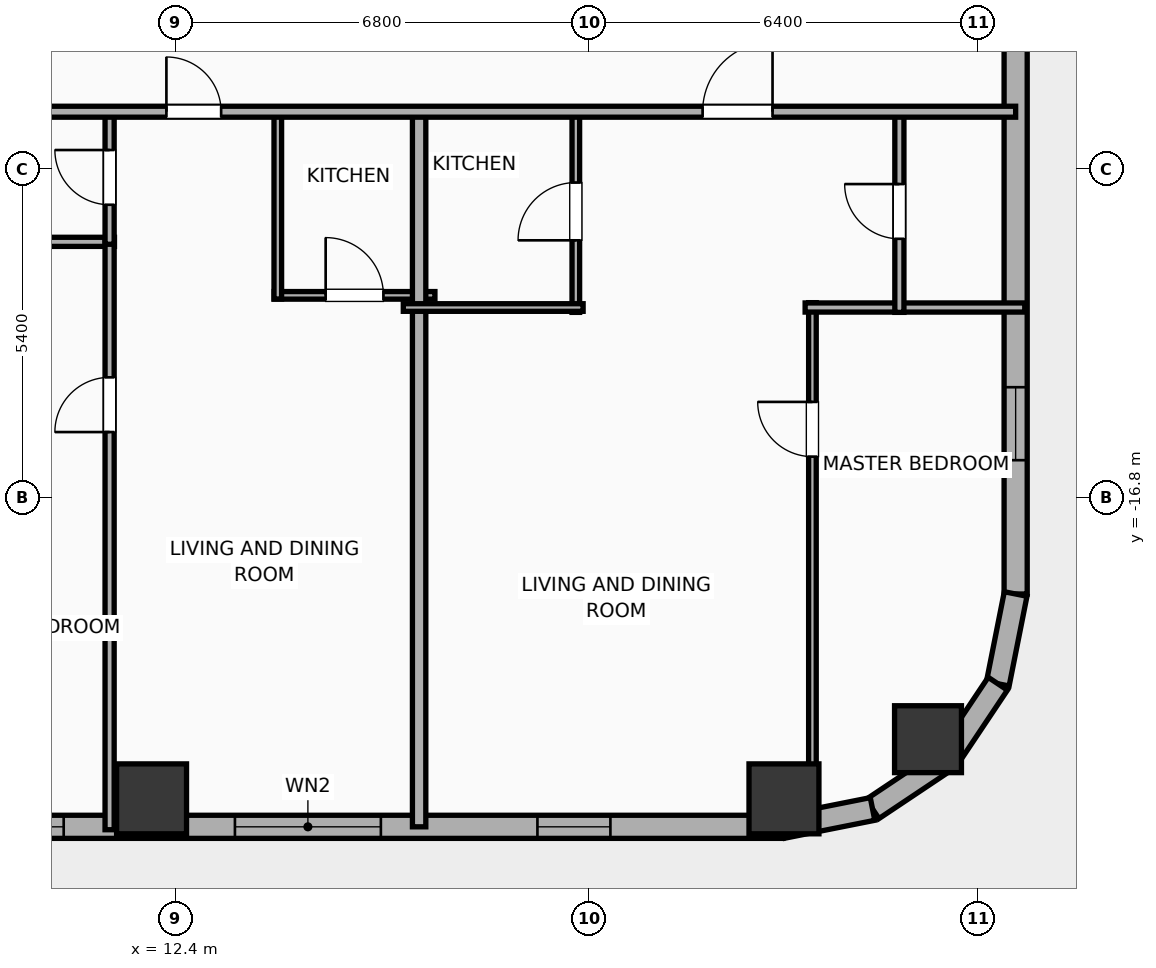
"""IFC4 building model, lengths in metres.
Left out: names, types, materials, properties, quantities, classifications, styles, units other than length and angle.
Written with IfcOpenShell. Run it as: python <this file> out.ifc"""

import sys

from ifc_helpers import new_model, si_unit, direction, frame, frame_2d, origin, origin_2d, place, context, subcontext, project, spatial, rectangle, hollow_rectangle, hollow_circle, extrude, element, fill, save


model = new_model("IFC4")
c1 = context("Model", 3, precision=1e-05, world=origin(), true_north=direction((0.0, 1.0)))
c2 = subcontext(c1, "Body", "Model", "MODEL_VIEW")
j1 = project(units=[si_unit("LENGTHUNIT", "METRE"), si_unit("PLANEANGLEUNIT", "RADIAN")], contexts=[c1])
p1 = place(None, origin())
s1 = spatial("IfcSite", under=j1, at=p1, CompositionType="ELEMENT")
p2 = place(p1, origin())
s2 = spatial("IfcBuilding", under=s1, at=p2, CompositionType="ELEMENT")
p3 = place(p2, frame((0.0, 0.0, 26.0)))
s3 = spatial("IfcBuildingStorey", under=s2, at=p3, CompositionType="ELEMENT", Elevation=26.0)
for number, where, z_axis, x_axis in (
    (1, (12.0, -21.75, -0.25), (0.0, 0.0, 1.0), (1.0, 0.0, 0.0)),
    (2, (22.4, -21.75, -0.25), (0.0, 0.0, 1.0), (1.0, 0.0, 0.0)),
):
    element("IfcColumn", number, at=place(p3, frame(where, z_axis=z_axis, x_axis=x_axis)), inside=s3, PredefinedType="COLUMN", context=c2, shape_type="SweptSolid", body=[
        extrude(hollow_rectangle(XDim=1.15, YDim=1.15, WallThickness=0.04, at=origin_2d()), origin(), (0.0, 0.0, 1.0), 4.15),
    ])
p4 = place(p3, frame((24.769, -20.769, -0.25), z_axis=(0.0, 0.0, 1.0), x_axis=(1.0, 0.0, 0.0)))
e3 = element("IfcColumn", 3, at=p4, inside=s3, PredefinedType="COLUMN", context=c2, shape_type="SweptSolid", body=[
    extrude(hollow_circle(Radius=0.55, WallThickness=0.036, at=origin_2d()), origin(), (0.0, 0.0, 1.0), 4.15),
])
p5 = place(p3, frame((22.381, -22.21, 0.0), z_axis=(0.0, 0.0, 1.0), x_axis=(-1.0, 0.0, 0.0)))
e4 = element("IfcWall", 4, at=p5, inside=s3, PredefinedType="ELEMENTEDWALL", context=c2, shape_type="SweptSolid", body=[
    extrude(rectangle(XDim=51.963, YDim=0.38, at=frame_2d((25.981, 0.0))), origin(), (0.0, 0.0, 1.0), 2.54),
])
p6 = place(p5, frame((25.231, 0.0, 0.0)))
e5 = element("IfcOpeningElement", 5, at=p6, cuts=e4, PredefinedType="OPENING", context=c2, shape_type="SweptSolid", body=[
    extrude(rectangle(XDim=1.5, YDim=2.05, at=frame_2d((0.75, 1.025))), frame((0.0, 0.2, 0.0), z_axis=(0.0, -1.0, 0.0), x_axis=(1.0, 0.0, 0.0)), (0.0, 0.0, 1.0), 0.4),
])
p7 = place(p5, frame((6.61, 0.0, 0.75)))
e6 = element("IfcOpeningElement", 6, at=p7, cuts=e4, PredefinedType="OPENING", context=c2, shape_type="SweptSolid", body=[
    extrude(rectangle(XDim=2.4, YDim=1.63, at=frame_2d((1.2, 0.815))), frame((0.0, 0.2, 0.0), z_axis=(0.0, -1.0, 0.0), x_axis=(1.0, 0.0, 0.0)), (0.0, 0.0, 1.0), 0.4),
])
p8 = place(p5, frame((49.132, 0.0, 0.75)))
e7 = element("IfcOpeningElement", 7, at=p8, cuts=e4, PredefinedType="OPENING", context=c2, shape_type="SweptSolid", body=[
    extrude(rectangle(XDim=1.2, YDim=1.63, at=frame_2d((0.6, 0.815))), frame((0.0, 0.2, 0.0), z_axis=(0.0, -1.0, 0.0), x_axis=(1.0, 0.0, 0.0)), (0.0, 0.0, 1.0), 0.4),
])
p9 = place(p5, frame((46.086, 0.0, 0.75)))
e8 = element("IfcOpeningElement", 8, at=p9, cuts=e4, PredefinedType="OPENING", context=c2, shape_type="SweptSolid", body=[
    extrude(rectangle(XDim=1.2, YDim=1.63, at=frame_2d((0.6, 0.815))), frame((0.0, 0.2, 0.0), z_axis=(0.0, -1.0, 0.0), x_axis=(1.0, 0.0, 0.0)), (0.0, 0.0, 1.0), 0.4),
])
p10 = place(p5, frame((42.426, 0.0, 0.75)))
e9 = element("IfcOpeningElement", 9, at=p10, cuts=e4, PredefinedType="OPENING", context=c2, shape_type="SweptSolid", body=[
    extrude(rectangle(XDim=1.2, YDim=1.63, at=frame_2d((0.6, 0.815))), frame((0.0, 0.2, 0.0), z_axis=(0.0, -1.0, 0.0), x_axis=(1.0, 0.0, 0.0)), (0.0, 0.0, 1.0), 0.4),
])
p11 = place(p5, frame((38.286, 0.0, 0.75)))
e10 = element("IfcOpeningElement", 10, at=p11, cuts=e4, PredefinedType="OPENING", context=c2, shape_type="SweptSolid", body=[
    extrude(rectangle(XDim=1.2, YDim=1.63, at=frame_2d((0.6, 0.815))), frame((0.0, 0.2, 0.0), z_axis=(0.0, -1.0, 0.0), x_axis=(1.0, 0.0, 0.0)), (0.0, 0.0, 1.0), 0.4),
])
p12 = place(p5, frame((35.219, 0.0, 0.75)))
e11 = element("IfcOpeningElement", 11, at=p12, cuts=e4, PredefinedType="OPENING", context=c2, shape_type="SweptSolid", body=[
    extrude(rectangle(XDim=1.2, YDim=1.63, at=frame_2d((0.6, 0.815))), frame((0.0, 0.2, 0.0), z_axis=(0.0, -1.0, 0.0), x_axis=(1.0, 0.0, 0.0)), (0.0, 0.0, 1.0), 0.4),
])
p13 = place(p5, frame((32.039, 0.0, 0.75)))
e12 = element("IfcOpeningElement", 12, at=p13, cuts=e4, PredefinedType="OPENING", context=c2, shape_type="SweptSolid", body=[
    extrude(rectangle(XDim=1.2, YDim=1.63, at=frame_2d((0.6, 0.815))), frame((0.0, 0.2, 0.0), z_axis=(0.0, -1.0, 0.0), x_axis=(1.0, 0.0, 0.0)), (0.0, 0.0, 1.0), 0.4),
])
p14 = place(p5, frame((22.686, 0.0, 0.75)))
e13 = element("IfcOpeningElement", 13, at=p14, cuts=e4, PredefinedType="OPENING", context=c2, shape_type="SweptSolid", body=[
    extrude(rectangle(XDim=1.2, YDim=1.63, at=frame_2d((0.6, 0.815))), frame((0.0, 0.2, 0.0), z_axis=(0.0, -1.0, 0.0), x_axis=(1.0, 0.0, 0.0)), (0.0, 0.0, 1.0), 0.4),
])
p15 = place(p5, frame((18.786, 0.0, 0.75)))
e14 = element("IfcOpeningElement", 14, at=p15, cuts=e4, PredefinedType="OPENING", context=c2, shape_type="SweptSolid", body=[
    extrude(rectangle(XDim=1.2, YDim=1.63, at=frame_2d((0.6, 0.815))), frame((0.0, 0.2, 0.0), z_axis=(0.0, -1.0, 0.0), x_axis=(1.0, 0.0, 0.0)), (0.0, 0.0, 1.0), 0.4),
])
p16 = place(p5, frame((14.886, 0.0, 0.75)))
e15 = element("IfcOpeningElement", 15, at=p16, cuts=e4, PredefinedType="OPENING", context=c2, shape_type="SweptSolid", body=[
    extrude(rectangle(XDim=1.2, YDim=1.63, at=frame_2d((0.6, 0.815))), frame((0.0, 0.2, 0.0), z_axis=(0.0, -1.0, 0.0), x_axis=(1.0, 0.0, 0.0)), (0.0, 0.0, 1.0), 0.4),
])
p17 = place(p5, frame((11.826, 0.0, 0.75)))
e16 = element("IfcOpeningElement", 16, at=p17, cuts=e4, PredefinedType="OPENING", context=c2, shape_type="SweptSolid", body=[
    extrude(rectangle(XDim=1.2, YDim=1.63, at=frame_2d((0.6, 0.815))), frame((0.0, 0.2, 0.0), z_axis=(0.0, -1.0, 0.0), x_axis=(1.0, 0.0, 0.0)), (0.0, 0.0, 1.0), 0.4),
])
p18 = place(p5, frame((2.836, 0.0, 0.75)))
e17 = element("IfcOpeningElement", 17, at=p18, cuts=e4, PredefinedType="OPENING", context=c2, shape_type="SweptSolid", body=[
    extrude(rectangle(XDim=1.2, YDim=1.63, at=frame_2d((0.6, 0.815))), frame((0.0, 0.2, 0.0), z_axis=(0.0, -1.0, 0.0), x_axis=(1.0, 0.0, 0.0)), (0.0, 0.0, 1.0), 0.4),
])
p19 = place(p3, frame((26.21, 18.381, 0.0), z_axis=(0.0, 0.0, 1.0), x_axis=(0.0, -1.0, 0.0)))
e18 = element("IfcWall", 18, at=p19, inside=s3, PredefinedType="ELEMENTEDWALL", context=c2, shape_type="SweptSolid", body=[
    extrude(rectangle(XDim=36.763, YDim=0.38, at=frame_2d((18.381, 0.0))), origin(), (0.0, 0.0, 1.0), 2.54),
])
p20 = place(p19, frame((33.362, 0.0, 0.75)))
e19 = element("IfcOpeningElement", 19, at=p20, cuts=e18, PredefinedType="OPENING", context=c2, shape_type="SweptSolid", body=[
    extrude(rectangle(XDim=1.2, YDim=1.63, at=frame_2d((0.6, 0.815))), frame((0.0, 0.2, 0.0), z_axis=(0.0, -1.0, 0.0), x_axis=(1.0, 0.0, 0.0)), (0.0, 0.0, 1.0), 0.4),
])
p21 = place(p3, frame((26.21, -18.381, 0.0), z_axis=(0.0, 0.0, 1.0), x_axis=(-0.195086038585, -0.980786132421, 0.0)))
e20 = element("IfcWall", 20, at=p21, inside=s3, PredefinedType="ELEMENTEDWALL", context=c2, shape_type="SweptSolid", body=[
    extrude(rectangle(XDim=1.504, YDim=0.38, at=frame_2d((0.752, 0.0))), origin(), (0.0, 0.0, 1.0), 3.65),
])
p22 = place(p3, frame((25.917, -19.857, 0.0), z_axis=(0.0, 0.0, 1.0), x_axis=(-0.555686231674, -0.831392092774, 0.0)))
e21 = element("IfcWall", 21, at=p22, inside=s3, PredefinedType="ELEMENTEDWALL", context=c2, shape_type="SweptSolid", body=[
    extrude(rectangle(XDim=1.485, YDim=0.38, at=frame_2d((0.743, 0.0))), origin(), (0.0, 0.0, 1.0), 3.65),
])
p23 = place(p3, frame((25.091, -21.091, 0.0), z_axis=(0.0, 0.0, 1.0), x_axis=(-0.831392092774, -0.555686231674, 0.0)))
e22 = element("IfcWall", 22, at=p23, inside=s3, PredefinedType="ELEMENTEDWALL", context=c2, shape_type="SweptSolid", body=[
    extrude(rectangle(XDim=1.485, YDim=0.38, at=frame_2d((0.743, 0.0))), origin(), (0.0, 0.0, 1.0), 2.54),
])
p24 = place(p3, frame((23.857, -21.917, 0.0), z_axis=(0.0, 0.0, 1.0), x_axis=(-0.980786132421, -0.195086038585, 0.0)))
e23 = element("IfcWall", 23, at=p24, inside=s3, PredefinedType="ELEMENTEDWALL", context=c2, shape_type="SweptSolid", body=[
    extrude(rectangle(XDim=1.504, YDim=0.38, at=frame_2d((0.752, 0.0))), origin(), (0.0, 0.0, 1.0), 2.54),
])
p25 = place(p3, frame((8.34, -12.59, 0.0), z_axis=(0.0, 0.0, 1.0), x_axis=(1.0, 0.0, 0.0)))
e24 = element("IfcWall", 24, at=p25, inside=s3, PredefinedType="PLUMBINGWALL", context=c2, shape_type="SweptSolid", body=[
    extrude(rectangle(XDim=3.05, YDim=0.15, at=frame_2d((1.525, 0.0))), origin(), (0.0, 0.0, 1.0), 3.65),
])
p26 = place(p3, frame((11.31, -22.258, 0.0), z_axis=(0.0, 0.0, 1.0), x_axis=(0.0, 1.0, 0.0)))
e25 = element("IfcWall", 25, at=p26, inside=s3, PredefinedType="PLUMBINGWALL", context=c2, shape_type="SweptSolid", body=[
    extrude(rectangle(XDim=9.708, YDim=0.15, at=frame_2d((4.854, 0.0))), origin(), (0.0, 0.0, 1.0), 3.65),
])
p27 = place(p26, frame((6.54, 0.0, 0.0)))
e26 = element("IfcOpeningElement", 26, at=p27, cuts=e25, PredefinedType="OPENING", context=c2, shape_type="SweptSolid", body=[
    extrude(rectangle(XDim=0.9, YDim=2.05, at=frame_2d((0.45, 1.025))), frame((0.0, 0.085, 0.0), z_axis=(0.0, -1.0, 0.0), x_axis=(1.0, 0.0, 0.0)), (0.0, 0.0, 1.0), 0.17),
])
p28 = place(p3, frame((11.31, -12.63, 0.0), z_axis=(0.0, 0.0, 1.0), x_axis=(0.0, 1.0, 0.0)))
e27 = element("IfcWall", 27, at=p28, inside=s3, PredefinedType="PLUMBINGWALL", context=c2, shape_type="SweptSolid", body=[
    extrude(rectangle(XDim=2.2, YDim=0.15, at=frame_2d((1.1, 0.0))), origin(), (0.0, 0.0, 1.0), 3.65),
])
p29 = place(p28, frame((0.65, 0.0, 0.0)))
e28 = element("IfcOpeningElement", 28, at=p29, cuts=e27, PredefinedType="OPENING", context=c2, shape_type="SweptSolid", body=[
    extrude(rectangle(XDim=0.9, YDim=2.05, at=frame_2d((0.45, 1.025))), frame((0.0, 0.085, 0.0), z_axis=(0.0, -1.0, 0.0), x_axis=(1.0, 0.0, 0.0)), (0.0, 0.0, 1.0), 0.17),
])
p30 = place(p3, frame((14.016, -13.47, 0.0), z_axis=(0.0, 0.0, 1.0), x_axis=(1.0, 0.0, 0.0)))
e29 = element("IfcWall", 29, at=p30, inside=s3, PredefinedType="PARTITIONING", context=c2, shape_type="SweptSolid", body=[
    extrude(rectangle(XDim=2.644, YDim=0.125, at=frame_2d((1.322, 0.0))), origin(), (0.0, 0.0, 1.0), 3.65),
])
p31 = place(p30, frame((0.847, 0.0, 0.0)))
e30 = element("IfcOpeningElement", 30, at=p31, cuts=e29, PredefinedType="OPENING", context=c2, shape_type="SweptSolid", body=[
    extrude(rectangle(XDim=0.95, YDim=2.05, at=frame_2d((0.475, 1.025))), frame((0.0, 0.073, 0.0), z_axis=(0.0, -1.0, 0.0), x_axis=(1.0, 0.0, 0.0)), (0.0, 0.0, 1.0), 0.145),
])
p32 = place(p3, frame((14.076, -13.53, 0.0), z_axis=(0.0, 0.0, 1.0), x_axis=(0.0, 1.0, 0.0)))
e31 = element("IfcWall", 31, at=p32, inside=s3, PredefinedType="PARTITIONING", context=c2, shape_type="SweptSolid", body=[
    extrude(rectangle(XDim=3.1, YDim=0.125, at=frame_2d((1.55, 0.0))), origin(), (0.0, 0.0, 1.0), 3.65),
])
p33 = place(p3, frame((16.4, -22.21, 0.0), z_axis=(0.0, 0.0, 1.0), x_axis=(0.0, 1.0, 0.0)))
e32 = element("IfcWall", 32, at=p33, inside=s3, PredefinedType="PARTITIONING", context=c2, shape_type="SweptSolid", body=[
    extrude(rectangle(XDim=11.84, YDim=0.22, at=frame_2d((5.92, 0.0))), origin(), (0.0, 0.0, 1.0), 3.65),
])
p34 = place(p3, frame((22.868, -22.266, 0.0), z_axis=(0.0, 0.0, 1.0), x_axis=(0.0, 1.0, 0.0)))
e33 = element("IfcWall", 33, at=p34, inside=s3, PredefinedType="PARTITIONING", context=c2, shape_type="SweptSolid", body=[
    extrude(rectangle(XDim=8.676, YDim=0.125, at=frame_2d((4.338, 0.0))), origin(), (0.0, 0.0, 1.0), 2.54),
])
p35 = place(p34, frame((6.144, 0.0, 0.0)))
e34 = element("IfcOpeningElement", 34, at=p35, cuts=e33, PredefinedType="OPENING", context=c2, shape_type="SweptSolid", body=[
    extrude(rectangle(XDim=0.9, YDim=2.05, at=frame_2d((0.45, 1.025))), frame((0.0, 0.073, 0.0), z_axis=(0.0, -1.0, 0.0), x_axis=(1.0, 0.0, 0.0)), (0.0, 0.0, 1.0), 0.145),
])
p36 = place(p3, frame((22.748, -13.67, 0.0), z_axis=(0.0, 0.0, 1.0), x_axis=(1.0, 0.0, 0.0)))
e35 = element("IfcWall", 35, at=p36, inside=s3, PredefinedType="PLUMBINGWALL", context=c2, shape_type="SweptSolid", body=[
    extrude(rectangle(XDim=3.612, YDim=0.15, at=frame_2d((1.806, 0.0))), origin(), (0.0, 0.0, 1.0), 3.65),
])
p37 = place(p3, frame((18.977, -13.75, 0.0), z_axis=(0.0, 0.0, 1.0), x_axis=(0.0, 1.0, 0.0)))
e36 = element("IfcWall", 36, at=p37, inside=s3, PredefinedType="PARTITIONING", context=c2, shape_type="SweptSolid", body=[
    extrude(rectangle(XDim=3.32, YDim=0.125, at=frame_2d((1.66, 0.0))), origin(), (0.0, 0.0, 1.0), 3.65),
])
p38 = place(p37, frame((1.185, 0.0, 0.0)))
e37 = element("IfcOpeningElement", 37, at=p38, cuts=e36, PredefinedType="OPENING", context=c2, shape_type="SweptSolid", body=[
    extrude(rectangle(XDim=0.95, YDim=2.05, at=frame_2d((0.475, 1.025))), frame((0.0, 0.073, 0.0), z_axis=(0.0, -1.0, 0.0), x_axis=(1.0, 0.0, 0.0)), (0.0, 0.0, 1.0), 0.145),
])
p39 = place(p3, frame((16.14, -13.67, 0.0), z_axis=(0.0, 0.0, 1.0), x_axis=(1.0, 0.0, 0.0)))
e38 = element("IfcWall", 38, at=p39, inside=s3, PredefinedType="PARTITIONING", context=c2, shape_type="SweptSolid", body=[
    extrude(rectangle(XDim=2.957, YDim=0.125, at=frame_2d((1.479, 0.0))), origin(), (0.0, 0.0, 1.0), 3.65),
])
p40 = place(p3, frame((24.298, -13.75, 0.0), z_axis=(0.0, 0.0, 1.0), x_axis=(0.0, 1.0, 0.0)))
e39 = element("IfcWall", 39, at=p40, inside=s3, PredefinedType="PLUMBINGWALL", context=c2, shape_type="SweptSolid", body=[
    extrude(rectangle(XDim=3.32, YDim=0.15, at=frame_2d((1.66, 0.0))), origin(), (0.0, 0.0, 1.0), 3.65),
])
p41 = place(p40, frame((1.21, 0.0, 0.0)))
e40 = element("IfcOpeningElement", 40, at=p41, cuts=e39, PredefinedType="OPENING", context=c2, shape_type="SweptSolid", body=[
    extrude(rectangle(XDim=0.9, YDim=2.05, at=frame_2d((0.45, 1.025))), frame((0.0, 0.085, 0.0), z_axis=(0.0, -1.0, 0.0), x_axis=(1.0, 0.0, 0.0)), (0.0, 0.0, 1.0), 0.17),
])
p42 = place(p3, frame((-33.41, -10.45, 0.0), z_axis=(0.0, 0.0, 1.0), x_axis=(1.0, 0.0, 0.0)))
e41 = element("IfcWall", 41, at=p42, inside=s3, PredefinedType="PARTITIONING", context=c2, shape_type="SweptSolid", body=[
    extrude(rectangle(XDim=59.62, YDim=0.18, at=frame_2d((29.81, 0.0))), origin(), (0.0, 0.0, 1.0), 3.65),
])
p43 = place(p42, frame((5.321, 0.0, 0.0)))
e42 = element("IfcOpeningElement", 42, at=p43, cuts=e41, PredefinedType="OPENING", context=c2, shape_type="SweptSolid", body=[
    extrude(rectangle(XDim=1.15, YDim=2.05, at=frame_2d((0.575, 1.025))), frame((0.0, 0.1, 0.0), z_axis=(0.0, -1.0, 0.0), x_axis=(1.0, 0.0, 0.0)), (0.0, 0.0, 1.0), 0.2),
])
p44 = place(p42, frame((14.3, 0.0, 0.0)))
e43 = element("IfcOpeningElement", 43, at=p44, cuts=e41, PredefinedType="OPENING", context=c2, shape_type="SweptSolid", body=[
    extrude(rectangle(XDim=1.15, YDim=2.05, at=frame_2d((0.575, 1.025))), frame((0.0, 0.1, 0.0), z_axis=(0.0, -1.0, 0.0), x_axis=(1.0, 0.0, 0.0)), (0.0, 0.0, 1.0), 0.2),
])
p45 = place(p42, frame((22.265, 0.0, 0.0)))
e44 = element("IfcOpeningElement", 44, at=p45, cuts=e41, PredefinedType="OPENING", context=c2, shape_type="SweptSolid", body=[
    extrude(rectangle(XDim=0.9, YDim=2.05, at=frame_2d((0.45, 1.025))), frame((0.0, 0.1, 0.0), z_axis=(0.0, -1.0, 0.0), x_axis=(1.0, 0.0, 0.0)), (0.0, 0.0, 1.0), 0.2),
])
p46 = place(p42, frame((29.903, 0.0, 0.0)))
e45 = element("IfcOpeningElement", 45, at=p46, cuts=e41, PredefinedType="OPENING", context=c2, shape_type="SweptSolid", body=[
    extrude(rectangle(XDim=1.15, YDim=2.05, at=frame_2d((0.575, 1.025))), frame((0.0, 0.1, 0.0), z_axis=(0.0, -1.0, 0.0), x_axis=(1.0, 0.0, 0.0)), (0.0, 0.0, 1.0), 0.2),
])
p47 = place(p42, frame((37.701, 0.0, 0.0)))
e46 = element("IfcOpeningElement", 46, at=p47, cuts=e41, PredefinedType="OPENING", context=c2, shape_type="SweptSolid", body=[
    extrude(rectangle(XDim=1.15, YDim=2.05, at=frame_2d((0.575, 1.025))), frame((0.0, 0.1, 0.0), z_axis=(0.0, -1.0, 0.0), x_axis=(1.0, 0.0, 0.0)), (0.0, 0.0, 1.0), 0.2),
])
p48 = place(p42, frame((45.654, 0.0, 0.0)))
e47 = element("IfcOpeningElement", 47, at=p48, cuts=e41, PredefinedType="OPENING", context=c2, shape_type="SweptSolid", body=[
    extrude(rectangle(XDim=0.9, YDim=2.05, at=frame_2d((0.45, 1.025))), frame((0.0, 0.1, 0.0), z_axis=(0.0, -1.0, 0.0), x_axis=(1.0, 0.0, 0.0)), (0.0, 0.0, 1.0), 0.2),
])
p49 = place(p42, frame((54.472, 0.0, 0.0)))
e48 = element("IfcOpeningElement", 48, at=p49, cuts=e41, PredefinedType="OPENING", context=c2, shape_type="SweptSolid", body=[
    extrude(rectangle(XDim=1.15, YDim=2.05, at=frame_2d((0.575, 1.025))), frame((0.0, 0.1, 0.0), z_axis=(0.0, -1.0, 0.0), x_axis=(1.0, 0.0, 0.0)), (0.0, 0.0, 1.0), 0.2),
])
p50 = place(p7, origin())
e49 = element("IfcWindow", 49, at=p50, inside=s3, PartitioningType="SINGLE_PANEL", PredefinedType="WINDOW", context=c2, shape_type="SweptSolid", body=[
    extrude(rectangle(XDim=2.4, YDim=1.63, at=frame_2d((1.2, 0.815))), frame((0.0, 0.03, 0.0), z_axis=(0.0, -1.0, 0.0), x_axis=(1.0, 0.0, 0.0)), (0.0, 0.0, 1.0), 0.06),
])
fill(e6, e49)
p51 = place(p17, origin())
e50 = element("IfcWindow", 50, at=p51, inside=s3, PartitioningType="SINGLE_PANEL", PredefinedType="WINDOW", context=c2, shape_type="SweptSolid", body=[
    extrude(rectangle(XDim=1.2, YDim=1.63, at=frame_2d((0.6, 0.815))), frame((0.0, 0.03, 0.0), z_axis=(0.0, -1.0, 0.0), x_axis=(1.0, 0.0, 0.0)), (0.0, 0.0, 1.0), 0.06),
])
fill(e16, e50)
p52 = place(p18, origin())
e51 = element("IfcWindow", 51, at=p52, inside=s3, PartitioningType="SINGLE_PANEL", PredefinedType="WINDOW", context=c2, shape_type="SweptSolid", body=[
    extrude(rectangle(XDim=1.2, YDim=1.63, at=frame_2d((0.6, 0.815))), frame((0.0, 0.03, 0.0), z_axis=(0.0, -1.0, 0.0), x_axis=(1.0, 0.0, 0.0)), (0.0, 0.0, 1.0), 0.06),
])
fill(e17, e51)
p53 = place(p20, origin())
e52 = element("IfcWindow", 52, at=p53, inside=s3, PartitioningType="SINGLE_PANEL", PredefinedType="WINDOW", context=c2, shape_type="SweptSolid", body=[
    extrude(rectangle(XDim=1.2, YDim=1.63, at=frame_2d((0.6, 0.815))), frame((0.0, 0.03, 0.0), z_axis=(0.0, -1.0, 0.0), x_axis=(1.0, 0.0, 0.0)), (0.0, 0.0, 1.0), 0.06),
])
fill(e19, e52)
p54 = place(p27, origin())
e53 = element("IfcDoor", 53, at=p54, inside=s3, OperationType="SINGLE_SWING_LEFT", PredefinedType="DOOR", context=c2, shape_type="SweptSolid", body=[
    extrude(rectangle(XDim=0.9, YDim=2.05, at=frame_2d((0.45, 1.025))), frame((0.0, 0.025, 0.0), z_axis=(0.0, -1.0, 0.0), x_axis=(1.0, 0.0, 0.0)), (0.0, 0.0, 1.0), 0.05),
])
fill(e26, e53)
p55 = place(p29, origin())
e54 = element("IfcDoor", 54, at=p55, inside=s3, OperationType="SINGLE_SWING_RIGHT", PredefinedType="DOOR", context=c2, shape_type="SweptSolid", body=[
    extrude(rectangle(XDim=0.9, YDim=2.05, at=frame_2d((0.45, 1.025))), frame((0.0, 0.025, 0.0), z_axis=(0.0, -1.0, 0.0), x_axis=(1.0, 0.0, 0.0)), (0.0, 0.0, 1.0), 0.05),
])
fill(e28, e54)
p56 = place(p31, origin())
e55 = element("IfcDoor", 55, at=p56, inside=s3, OperationType="SINGLE_SWING_LEFT", PredefinedType="DOOR", context=c2, shape_type="SweptSolid", body=[
    extrude(rectangle(XDim=0.95, YDim=2.05, at=frame_2d((0.475, 1.025))), frame((0.0, 0.025, 0.0), z_axis=(0.0, -1.0, 0.0), x_axis=(1.0, 0.0, 0.0)), (0.0, 0.0, 1.0), 0.05),
])
fill(e30, e55)
p57 = place(p35, origin())
e56 = element("IfcDoor", 56, at=p57, inside=s3, OperationType="SINGLE_SWING_RIGHT", PredefinedType="DOOR", context=c2, shape_type="SweptSolid", body=[
    extrude(rectangle(XDim=0.9, YDim=2.05, at=frame_2d((0.45, 1.025))), frame((0.0, 0.025, 0.0), z_axis=(0.0, -1.0, 0.0), x_axis=(1.0, 0.0, 0.0)), (0.0, 0.0, 1.0), 0.05),
])
fill(e34, e56)
p58 = place(p38, origin())
e57 = element("IfcDoor", 57, at=p58, inside=s3, OperationType="SINGLE_SWING_LEFT", PredefinedType="DOOR", context=c2, shape_type="SweptSolid", body=[
    extrude(rectangle(XDim=0.95, YDim=2.05, at=frame_2d((0.475, 1.025))), frame((0.0, 0.025, 0.0), z_axis=(0.0, -1.0, 0.0), x_axis=(1.0, 0.0, 0.0)), (0.0, 0.0, 1.0), 0.05),
])
fill(e37, e57)
p59 = place(p41, origin())
e58 = element("IfcDoor", 58, at=p59, inside=s3, OperationType="SINGLE_SWING_RIGHT", PredefinedType="DOOR", context=c2, shape_type="SweptSolid", body=[
    extrude(rectangle(XDim=0.9, YDim=2.05, at=frame_2d((0.45, 1.025))), frame((0.0, 0.025, 0.0), z_axis=(0.0, -1.0, 0.0), x_axis=(1.0, 0.0, 0.0)), (0.0, 0.0, 1.0), 0.05),
])
fill(e40, e58)
p60 = place(p48, origin())
e59 = element("IfcDoor", 59, at=p60, inside=s3, OperationType="SINGLE_SWING_LEFT", PredefinedType="DOOR", context=c2, shape_type="SweptSolid", body=[
    extrude(rectangle(XDim=0.9, YDim=2.05, at=frame_2d((0.45, 1.025))), frame((0.0, 0.025, 0.0), z_axis=(0.0, -1.0, 0.0), x_axis=(1.0, 0.0, 0.0)), (0.0, 0.0, 1.0), 0.05),
])
fill(e47, e59)
p61 = place(p49, origin())
e60 = element("IfcDoor", 60, at=p61, inside=s3, OperationType="SINGLE_SWING_RIGHT", PredefinedType="DOOR", context=c2, shape_type="SweptSolid", body=[
    extrude(rectangle(XDim=1.15, YDim=2.05, at=frame_2d((0.575, 1.025))), frame((0.0, 0.025, 0.0), z_axis=(0.0, -1.0, 0.0), x_axis=(1.0, 0.0, 0.0)), (0.0, 0.0, 1.0), 0.05),
])
fill(e48, e60)
save(model, sys.argv[1])
